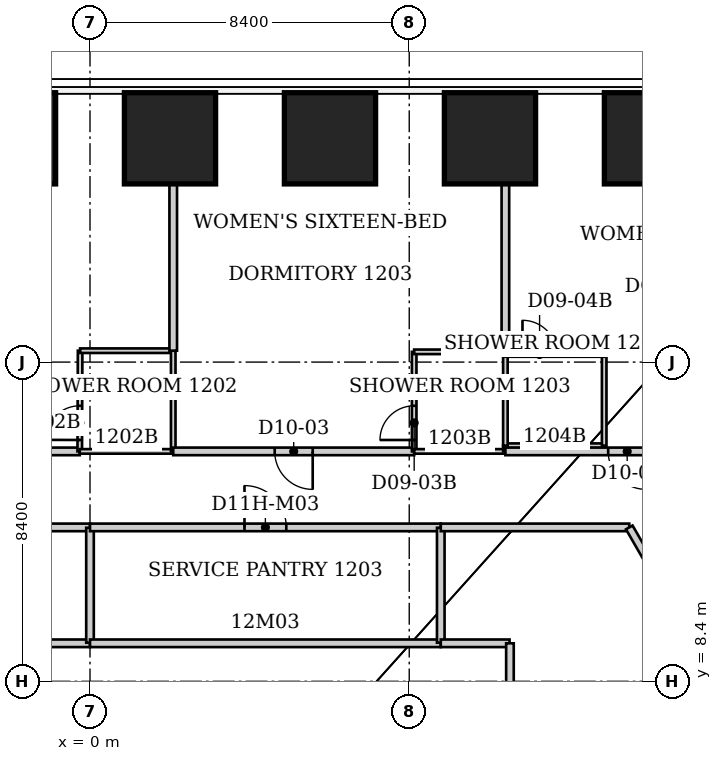
"""IFC4 building model, lengths in metres.
Left out: names, types, materials, properties, quantities, classifications, styles, units other than length and angle.
Written with IfcOpenShell. Run it as: python <this file> out.ifc"""

import sys

from ifc_helpers import new_model, si_unit, direction, frame, frame_2d, origin, origin_2d, place, context, subcontext, project, spatial, rectangle, extrude, clip, halfspace, element, fill, save


model = new_model("IFC4")
c1 = context("Model", 3, precision=1e-05, world=origin(), true_north=direction((0.0, 1.0)))
c2 = subcontext(c1, "Body", "Model", "MODEL_VIEW")
j1 = project(units=[si_unit("LENGTHUNIT", "METRE"), si_unit("PLANEANGLEUNIT", "RADIAN")], contexts=[c1])
p1 = place(None, origin())
s1 = spatial("IfcSite", under=j1, at=p1, CompositionType="ELEMENT")
p2 = place(p1, origin())
s2 = spatial("IfcBuilding", under=s1, at=p2, CompositionType="ELEMENT")
p3 = place(p2, frame((0.0, 0.0, 53.4)))
s3 = spatial("IfcBuildingStorey", under=s2, at=p3, CompositionType="ELEMENT", Elevation=53.4)
for number, where, z_axis, x_axis in (
    (1, (-2.105, 22.689, 0.0), (0.0, 0.0, 1.0), (0.0, 1.0, 0.0)),
    (2, (2.105, 22.689, 0.0), (0.0, 0.0, 1.0), (0.0, 1.0, 0.0)),
):
    element("IfcColumn", number, at=place(p3, frame(where, z_axis=z_axis, x_axis=x_axis)), inside=s3, PredefinedType="COLUMN", context=c2, shape_type="SweptSolid", body=[
        clip(extrude(rectangle(XDim=2.4, YDim=2.4, at=origin_2d()), origin(), (0.0, 0.0, 1.0), 3.752), halfspace(frame((0.0, 0.0, 3.64)), False)),
    ])
p4 = place(p3, frame((6.315, 22.689, 0.0), z_axis=(0.0, 0.0, 1.0), x_axis=(0.0, 1.0, 0.0)))
e3 = element("IfcColumn", 3, at=p4, inside=s3, PredefinedType="COLUMN", context=c2, shape_type="SweptSolid", body=[
    clip(extrude(rectangle(XDim=2.4, YDim=2.4, at=origin_2d()), origin(), (0.0, 0.0, 1.0), 3.744), halfspace(frame((0.0, 0.0, 3.64)), False)),
])
p5 = place(p3, frame((10.525, 22.689, 0.0), z_axis=(0.0, 0.0, 1.0), x_axis=(0.0, 1.0, 0.0)))
e4 = element("IfcColumn", 4, at=p5, inside=s3, PredefinedType="COLUMN", context=c2, shape_type="SweptSolid", body=[
    clip(extrude(rectangle(XDim=2.4, YDim=2.4, at=origin_2d()), origin(), (0.0, 0.0, 1.0), 3.736), halfspace(frame((0.0, 0.0, 3.64)), False)),
])
p6 = place(p3, frame((14.735, 22.689, 0.0), z_axis=(0.0, 0.0, 1.0), x_axis=(0.0, 1.0, 0.0)))
e5 = element("IfcColumn", 5, at=p6, inside=s3, PredefinedType="COLUMN", context=c2, shape_type="SweptSolid", body=[
    clip(extrude(rectangle(XDim=2.4, YDim=2.4, at=origin_2d()), origin(), (0.0, 0.0, 1.0), 3.728), halfspace(frame((0.0, 0.0, 3.64)), False)),
])
p7 = place(p3, frame((-9.23, 12.45, 0.0), z_axis=(0.0, 0.0, 1.0), x_axis=(1.0, 0.0, 0.0)))
e6 = element("IfcWall", 6, at=p7, inside=s3, PredefinedType="PARTITIONING", context=c2, shape_type="SweptSolid", body=[
    extrude(rectangle(XDim=9.23, YDim=0.2, at=frame_2d((4.615, 0.0))), origin(), (0.0, 0.0, 1.0), 3.64),
])
p8 = place(p7, frame((4.065, 0.0, 0.0)))
e7 = element("IfcOpeningElement", 7, at=p8, cuts=e6, PredefinedType="OPENING", context=c2, shape_type="SweptSolid", body=[
    extrude(rectangle(XDim=1.1, YDim=2.2, at=frame_2d((0.55, 1.1))), frame((0.0, 0.1, 0.0), z_axis=(0.0, -1.0, 0.0), x_axis=(1.0, 0.0, 0.0)), (0.0, 0.0, 1.0), 0.2),
])
p9 = place(p3, frame((-0.27, 14.45, 0.0), z_axis=(0.0, 0.0, 1.0), x_axis=(-1.0, 0.0, 0.0)))
e8 = element("IfcWall", 8, at=p9, inside=s3, PredefinedType="PARTITIONING", context=c2, shape_type="SweptSolid", body=[
    extrude(rectangle(XDim=8.84, YDim=0.2, at=frame_2d((4.42, 0.0))), origin(), (0.0, 0.0, 1.0), 3.64),
])
p10 = place(p9, frame((3.92, 0.0, 0.0)))
e9 = element("IfcOpeningElement", 9, at=p10, cuts=e8, PredefinedType="OPENING", context=c2, shape_type="SweptSolid", body=[
    extrude(rectangle(XDim=1.0, YDim=2.13, at=frame_2d((0.5, 1.065))), frame((0.0, 0.1, 0.0), z_axis=(0.0, -1.0, 0.0), x_axis=(1.0, 0.0, 0.0)), (0.0, 0.0, 1.0), 0.2),
])
p11 = place(p3, frame((-0.26, 17.1, 0.0), z_axis=(0.0, 0.0, 1.0), x_axis=(-0.00377703432, -0.99999286698, 0.0)))
e10 = element("IfcWall", 10, at=p11, inside=s3, PredefinedType="PARTITIONING", context=c2, shape_type="SweptSolid", body=[
    extrude(rectangle(XDim=2.65, YDim=0.12, at=frame_2d((1.325, 0.0))), origin(), (0.0, 0.0, 1.0), 3.64),
])
p12 = place(p11, frame((1.45, 0.0, 0.0)))
e11 = element("IfcOpeningElement", 11, at=p12, cuts=e10, PredefinedType="OPENING", context=c2, shape_type="SweptSolid", body=[
    extrude(rectangle(XDim=0.9, YDim=2.03, at=frame_2d((0.45, 1.015))), frame((0.0, 0.06, 0.0), z_axis=(0.0, -1.0, 0.0), x_axis=(1.0, 0.0, 0.0)), (0.0, 0.0, 1.0), 0.12),
])
p13 = place(p3, frame((0.0, 9.4, 0.0), z_axis=(0.0, 0.0, 1.0), x_axis=(-1.0, 0.0, 0.0)))
e12 = element("IfcWall", 12, at=p13, inside=s3, PredefinedType="PARTITIONING", context=c2, shape_type="SweptSolid", body=[
    extrude(rectangle(XDim=9.23, YDim=0.2, at=frame_2d((4.615, 0.0))), origin(), (0.0, 0.0, 1.0), 3.64),
])
p14 = place(p3, frame((0.0, 12.44, 0.0), z_axis=(0.0, 0.0, 1.0), x_axis=(0.0, -1.0, 0.0)))
e13 = element("IfcWall", 13, at=p14, inside=s3, PredefinedType="PARTITIONING", context=c2, shape_type="SweptSolid", body=[
    extrude(rectangle(XDim=3.025, YDim=0.2, at=frame_2d((1.512, 0.0))), origin(), (0.0, 0.0, 1.0), 2.878),
])
p15 = place(p3, frame((0.0, 12.45, 0.0), z_axis=(0.0, 0.0, 1.0), x_axis=(1.0, 0.0, 0.0)))
e14 = element("IfcWall", 14, at=p15, inside=s3, PredefinedType="PARTITIONING", context=c2, shape_type="SweptSolid", body=[
    extrude(rectangle(XDim=9.23, YDim=0.2, at=frame_2d((4.615, 0.0))), origin(), (0.0, 0.0, 1.0), 3.64),
])
p16 = place(p15, frame((4.065, 0.0, 0.0)))
e15 = element("IfcOpeningElement", 15, at=p16, cuts=e14, PredefinedType="OPENING", context=c2, shape_type="SweptSolid", body=[
    extrude(rectangle(XDim=1.1, YDim=2.2, at=frame_2d((0.55, 1.1))), frame((0.0, 0.1, 0.0), z_axis=(0.0, -1.0, 0.0), x_axis=(1.0, 0.0, 0.0)), (0.0, 0.0, 1.0), 0.2),
])
p17 = place(p3, frame((2.19, 14.45, 0.0), z_axis=(0.0, 0.0, 1.0), x_axis=(-1.0, 0.0, 0.0)))
e16 = element("IfcWall", 16, at=p17, inside=s3, PredefinedType="PARTITIONING", context=c2, shape_type="SweptSolid", body=[
    extrude(rectangle(XDim=2.46, YDim=0.12, at=frame_2d((1.23, 0.0))), origin(), (0.0, 0.0, 1.0), 3.64),
])
p18 = place(p3, frame((2.19, 17.1, 0.0), z_axis=(0.0, 0.0, 1.0), x_axis=(-1.0, 0.0, 0.0)))
e17 = element("IfcWall", 17, at=p18, inside=s3, PredefinedType="PARTITIONING", context=c2, shape_type="SweptSolid", body=[
    extrude(rectangle(XDim=2.45, YDim=0.12, at=frame_2d((1.225, 0.0))), origin(), (0.0, 0.0, 1.0), 3.64),
])
p19 = place(p3, frame((2.19, 17.1, 0.0), z_axis=(0.0, 0.0, 1.0), x_axis=(0.0, -1.0, 0.0)))
e18 = element("IfcWall", 18, at=p19, inside=s3, PredefinedType="PARTITIONING", context=c2, shape_type="SweptSolid", body=[
    extrude(rectangle(XDim=2.65, YDim=0.12, at=frame_2d((1.325, 0.0))), origin(), (0.0, 0.0, 1.0), 2.878),
])
p20 = place(p3, frame((2.19, 23.83, 0.0), z_axis=(0.0, 0.0, 1.0), x_axis=(0.0, -1.0, 0.0)))
e19 = element("IfcWall", 19, at=p20, inside=s3, PredefinedType="PARTITIONING", context=c2, shape_type="SweptSolid", body=[
    extrude(rectangle(XDim=6.73, YDim=0.2, at=frame_2d((3.365, 0.0))), origin(), (0.0, 0.0, 1.0), 2.878),
])
p21 = place(p3, frame((8.53, 14.45, 0.0), z_axis=(0.0, 0.0, 1.0), x_axis=(-1.0, 0.0, 0.0)))
e20 = element("IfcWall", 20, at=p21, inside=s3, PredefinedType="PARTITIONING", context=c2, shape_type="SweptSolid", body=[
    extrude(rectangle(XDim=6.34, YDim=0.2, at=frame_2d((3.17, 0.0))), origin(), (0.0, 0.0, 1.0), 3.64),
])
p22 = place(p21, frame((2.67, 0.0, 0.0)))
e21 = element("IfcOpeningElement", 21, at=p22, cuts=e20, PredefinedType="OPENING", context=c2, shape_type="SweptSolid", body=[
    extrude(rectangle(XDim=1.0, YDim=2.13, at=frame_2d((0.5, 1.065))), frame((0.0, 0.1, 0.0), z_axis=(0.0, -1.0, 0.0), x_axis=(1.0, 0.0, 0.0)), (0.0, 0.0, 1.0), 0.2),
])
p23 = place(p3, frame((8.53, 17.07, 0.0), z_axis=(0.0, 0.0, 1.0), x_axis=(0.0, -1.0, 0.0)))
e22 = element("IfcWall", 22, at=p23, inside=s3, PredefinedType="PARTITIONING", context=c2, shape_type="SweptSolid", body=[
    extrude(rectangle(XDim=2.62, YDim=0.12, at=frame_2d((1.31, 0.0))), origin(), (0.0, 0.0, 1.0), 2.878),
])
p24 = place(p23, frame((1.42, 0.0, 0.0)))
e23 = element("IfcOpeningElement", 23, at=p24, cuts=e22, PredefinedType="OPENING", context=c2, shape_type="SweptSolid", body=[
    extrude(rectangle(XDim=0.9, YDim=2.03, at=frame_2d((0.45, 1.015))), frame((0.0, 0.06, 0.0), z_axis=(0.0, -1.0, 0.0), x_axis=(1.0, 0.0, 0.0)), (0.0, 0.0, 1.0), 0.12),
])
p25 = place(p3, frame((9.23, 9.4, 0.0), z_axis=(0.0, 0.0, 1.0), x_axis=(-1.0, 0.0, 0.0)))
e24 = element("IfcWall", 24, at=p25, inside=s3, PredefinedType="PARTITIONING", context=c2, shape_type="SweptSolid", body=[
    extrude(rectangle(XDim=9.23, YDim=0.2, at=frame_2d((4.615, 0.0))), origin(), (0.0, 0.0, 1.0), 3.64),
])
p26 = place(p3, frame((9.23, 12.44, 0.0), z_axis=(0.0, 0.0, 1.0), x_axis=(0.0, -1.0, 0.0)))
e25 = element("IfcWall", 25, at=p26, inside=s3, PredefinedType="PARTITIONING", context=c2, shape_type="SweptSolid", body=[
    extrude(rectangle(XDim=3.025, YDim=0.2, at=frame_2d((1.512, 0.0))), origin(), (0.0, 0.0, 1.0), 3.64),
])
p27 = place(p3, frame((9.23, 12.45, 0.0), z_axis=(0.0, 0.0, 1.0), x_axis=(1.0, 0.0, 0.0)))
e26 = element("IfcWall", 26, at=p27, inside=s3, PredefinedType="PARTITIONING", context=c2, shape_type="SweptSolid", body=[
    extrude(rectangle(XDim=4.96, YDim=0.2, at=frame_2d((2.48, 0.0))), origin(), (0.0, 0.0, 1.0), 3.64),
])
p28 = place(p3, frame((10.93, 14.45, 0.0), z_axis=(0.0, 0.0, 1.0), x_axis=(-1.0, 0.0, 0.0)))
e27 = element("IfcWall", 27, at=p28, inside=s3, PredefinedType="PARTITIONING", context=c2, shape_type="SweptSolid", body=[
    extrude(rectangle(XDim=2.4, YDim=0.12, at=frame_2d((1.2, 0.0))), origin(), (0.0, 0.0, 1.0), 3.64),
])
p29 = place(p3, frame((10.93, 14.6, 0.0), z_axis=(0.0, 0.0, 1.0), x_axis=(0.0, -1.0, 0.0)))
e28 = element("IfcWall", 28, at=p29, inside=s3, PredefinedType="PARTITIONING", context=c2, shape_type="SweptSolid", body=[
    extrude(rectangle(XDim=0.15, YDim=0.12, at=frame_2d((0.075, 0.0))), origin(), (0.0, 0.0, 1.0), 3.64),
])
p30 = place(p3, frame((10.93, 14.6, 0.0), z_axis=(0.0, 0.0, 1.0), x_axis=(1.0, 0.0, 0.0)))
e29 = element("IfcWall", 29, at=p30, inside=s3, PredefinedType="PARTITIONING", context=c2, shape_type="SweptSolid", body=[
    extrude(rectangle(XDim=2.6, YDim=0.12, at=frame_2d((1.3, 0.0))), origin(), (0.0, 0.0, 1.0), 3.64),
])
for number, where, z_axis, x_axis in (
    (30, (10.93, 17.0, 0.0), (0.0, 0.0, 1.0), (0.0, -1.0, 0.0)),
    (31, (10.93, 17.07, 0.0), (0.0, 0.0, 1.0), (-1.0, 0.0, 0.0)),
):
    element("IfcWall", number, at=place(p3, frame(where, z_axis=z_axis, x_axis=x_axis)), inside=s3, PredefinedType="PARTITIONING", context=c2, shape_type="SweptSolid", body=[
        extrude(rectangle(XDim=2.4, YDim=0.12, at=frame_2d((1.2, 0.0))), origin(), (0.0, 0.0, 1.0), 3.64),
    ])
p31 = place(p3, frame((10.93, 23.83, 0.0), z_axis=(0.0, 0.0, 1.0), x_axis=(0.0, -1.0, 0.0)))
e32 = element("IfcWall", 32, at=p31, inside=s3, PredefinedType="PARTITIONING", context=c2, shape_type="SweptSolid", body=[
    extrude(rectangle(XDim=6.76, YDim=0.2, at=frame_2d((3.38, 0.0))), origin(), (0.0, 0.0, 1.0), 3.64),
])
p32 = place(p3, frame((11.04, 9.4, 0.0), z_axis=(0.0, 0.0, 1.0), x_axis=(-1.0, 0.0, 0.0)))
e33 = element("IfcWall", 33, at=p32, inside=s3, PredefinedType="PARTITIONING", context=c2, shape_type="SweptSolid", body=[
    extrude(rectangle(XDim=1.81, YDim=0.2, at=frame_2d((0.905, 0.0))), origin(), (0.0, 0.0, 1.0), 3.64),
])
p33 = place(p3, frame((11.05, -7.76, 0.0), z_axis=(0.0, 0.0, 1.0), x_axis=(0.0, 1.0, 0.0)))
e34 = element("IfcWall", 34, at=p33, inside=s3, PredefinedType="PARTITIONING", context=c2, shape_type="SweptSolid", body=[
    extrude(rectangle(XDim=17.16, YDim=0.2, at=frame_2d((8.58, 0.0))), origin(), (0.0, 0.0, 1.0), 3.64),
])
p34 = place(p33, frame((8.03, 0.0, 0.0)))
e35 = element("IfcOpeningElement", 35, at=p34, cuts=e34, PredefinedType="OPENING", context=c2, shape_type="SweptSolid", body=[
    extrude(rectangle(XDim=1.1, YDim=2.2, at=frame_2d((0.55, 1.1))), frame((0.0, 0.1, 0.0), z_axis=(0.0, -1.0, 0.0), x_axis=(1.0, 0.0, 0.0)), (0.0, 0.0, 1.0), 0.2),
])
p35 = place(p3, frame((13.53, 14.6, 0.0), z_axis=(0.0, 0.0, 1.0), x_axis=(0.0, 1.0, 0.0)))
e36 = element("IfcWall", 36, at=p35, inside=s3, PredefinedType="PARTITIONING", context=c2, shape_type="SweptSolid", body=[
    extrude(rectangle(XDim=2.4, YDim=0.12, at=frame_2d((1.2, 0.0))), origin(), (0.0, 0.0, 1.0), 3.64),
])
p36 = place(p3, frame((13.53, 17.0, 0.0), z_axis=(0.0, 0.0, 1.0), x_axis=(-1.0, 0.0, 0.0)))
e37 = element("IfcWall", 37, at=p36, inside=s3, PredefinedType="PARTITIONING", context=c2, shape_type="SweptSolid", body=[
    extrude(rectangle(XDim=2.6, YDim=0.12, at=frame_2d((1.3, 0.0))), origin(), (0.0, 0.0, 1.0), 3.64),
])
p37 = place(p36, frame((1.25, 0.0, 0.0)))
e38 = element("IfcOpeningElement", 38, at=p37, cuts=e37, PredefinedType="OPENING", context=c2, shape_type="SweptSolid", body=[
    extrude(rectangle(XDim=0.9, YDim=2.03, at=frame_2d((0.45, 1.015))), frame((0.0, 0.06, 0.0), z_axis=(0.0, -1.0, 0.0), x_axis=(1.0, 0.0, 0.0)), (0.0, 0.0, 1.0), 0.12),
])
p38 = place(p3, frame((14.19, 12.45, 0.0), z_axis=(0.0, 0.0, 1.0), x_axis=(0.499424260127, -0.866357552282, 0.0)))
e39 = element("IfcWall", 39, at=p38, inside=s3, PredefinedType="PARTITIONING", context=c2, shape_type="SweptSolid", body=[
    extrude(rectangle(XDim=8.53, YDim=0.2, at=frame_2d((4.265, 0.0))), origin(), (0.0, 0.0, 1.0), 3.64),
])
p39 = place(p3, frame((15.34, 14.45, 0.0), z_axis=(0.0, 0.0, 1.0), x_axis=(-1.0, 0.0, 0.0)))
e40 = element("IfcWall", 40, at=p39, inside=s3, PredefinedType="PARTITIONING", context=c2, shape_type="SweptSolid", body=[
    extrude(rectangle(XDim=4.41, YDim=0.2, at=frame_2d((2.205, 0.0))), origin(), (0.0, 0.0, 1.0), 3.64),
])
p40 = place(p39, frame((0.705, 0.0, 0.0)))
e41 = element("IfcOpeningElement", 41, at=p40, cuts=e40, PredefinedType="OPENING", context=c2, shape_type="SweptSolid", body=[
    extrude(rectangle(XDim=1.0, YDim=2.13, at=frame_2d((0.5, 1.065))), frame((0.0, 0.1, 0.0), z_axis=(0.0, -1.0, 0.0), x_axis=(1.0, 0.0, 0.0)), (0.0, 0.0, 1.0), 0.2),
])
p41 = place(p12, origin())
e42 = element("IfcDoor", 42, at=p41, inside=s3, OperationType="SINGLE_SWING_RIGHT", PredefinedType="DOOR", context=c2, shape_type="SweptSolid", body=[
    extrude(rectangle(XDim=0.9, YDim=2.03, at=frame_2d((0.45, 1.015))), frame((0.0, 0.025, 0.0), z_axis=(0.0, -1.0, 0.0), x_axis=(1.0, 0.0, 0.0)), (0.0, 0.0, 1.0), 0.05),
])
fill(e11, e42)
p42 = place(p22, origin())
e43 = element("IfcDoor", 43, at=p42, inside=s3, OperationType="SINGLE_SWING_LEFT", PredefinedType="DOOR", context=c2, shape_type="SweptSolid", body=[
    extrude(rectangle(XDim=1.0, YDim=2.13, at=frame_2d((0.5, 1.065))), frame((0.0, 0.025, 0.0), z_axis=(0.0, -1.0, 0.0), x_axis=(1.0, 0.0, 0.0)), (0.0, 0.0, 1.0), 0.05),
])
fill(e21, e43)
p43 = place(p24, origin())
e44 = element("IfcDoor", 44, at=p43, inside=s3, OperationType="SINGLE_SWING_RIGHT", PredefinedType="DOOR", context=c2, shape_type="SweptSolid", body=[
    extrude(rectangle(XDim=0.9, YDim=2.03, at=frame_2d((0.45, 1.015))), frame((0.0, 0.025, 0.0), z_axis=(0.0, -1.0, 0.0), x_axis=(1.0, 0.0, 0.0)), (0.0, 0.0, 1.0), 0.05),
])
fill(e23, e44)
p44 = place(p40, origin())
e45 = element("IfcDoor", 45, at=p44, inside=s3, OperationType="SINGLE_SWING_LEFT", PredefinedType="DOOR", context=c2, shape_type="SweptSolid", body=[
    extrude(rectangle(XDim=1.0, YDim=2.13, at=frame_2d((0.5, 1.065))), frame((0.0, 0.025, 0.0), z_axis=(0.0, -1.0, 0.0), x_axis=(1.0, 0.0, 0.0)), (0.0, 0.0, 1.0), 0.05),
])
fill(e41, e45)
p45 = place(p37, origin())
e46 = element("IfcDoor", 46, at=p45, inside=s3, OperationType="SINGLE_SWING_RIGHT", PredefinedType="DOOR", context=c2, shape_type="SweptSolid", body=[
    extrude(rectangle(XDim=0.9, YDim=2.03, at=frame_2d((0.45, 1.015))), frame((0.0, 0.025, 0.0), z_axis=(0.0, -1.0, 0.0), x_axis=(1.0, 0.0, 0.0)), (0.0, 0.0, 1.0), 0.05),
])
fill(e38, e46)
p46 = place(p16, origin())
e47 = element("IfcDoor", 47, at=p46, inside=s3, OperationType="SINGLE_SWING_LEFT", PredefinedType="DOOR", context=c2, shape_type="SweptSolid", body=[
    extrude(rectangle(XDim=1.1, YDim=2.2, at=frame_2d((0.55, 1.1))), frame((0.0, 0.025, 0.0), z_axis=(0.0, -1.0, 0.0), x_axis=(1.0, 0.0, 0.0)), (0.0, 0.0, 1.0), 0.05),
])
fill(e15, e47)
save(model, sys.argv[1])
